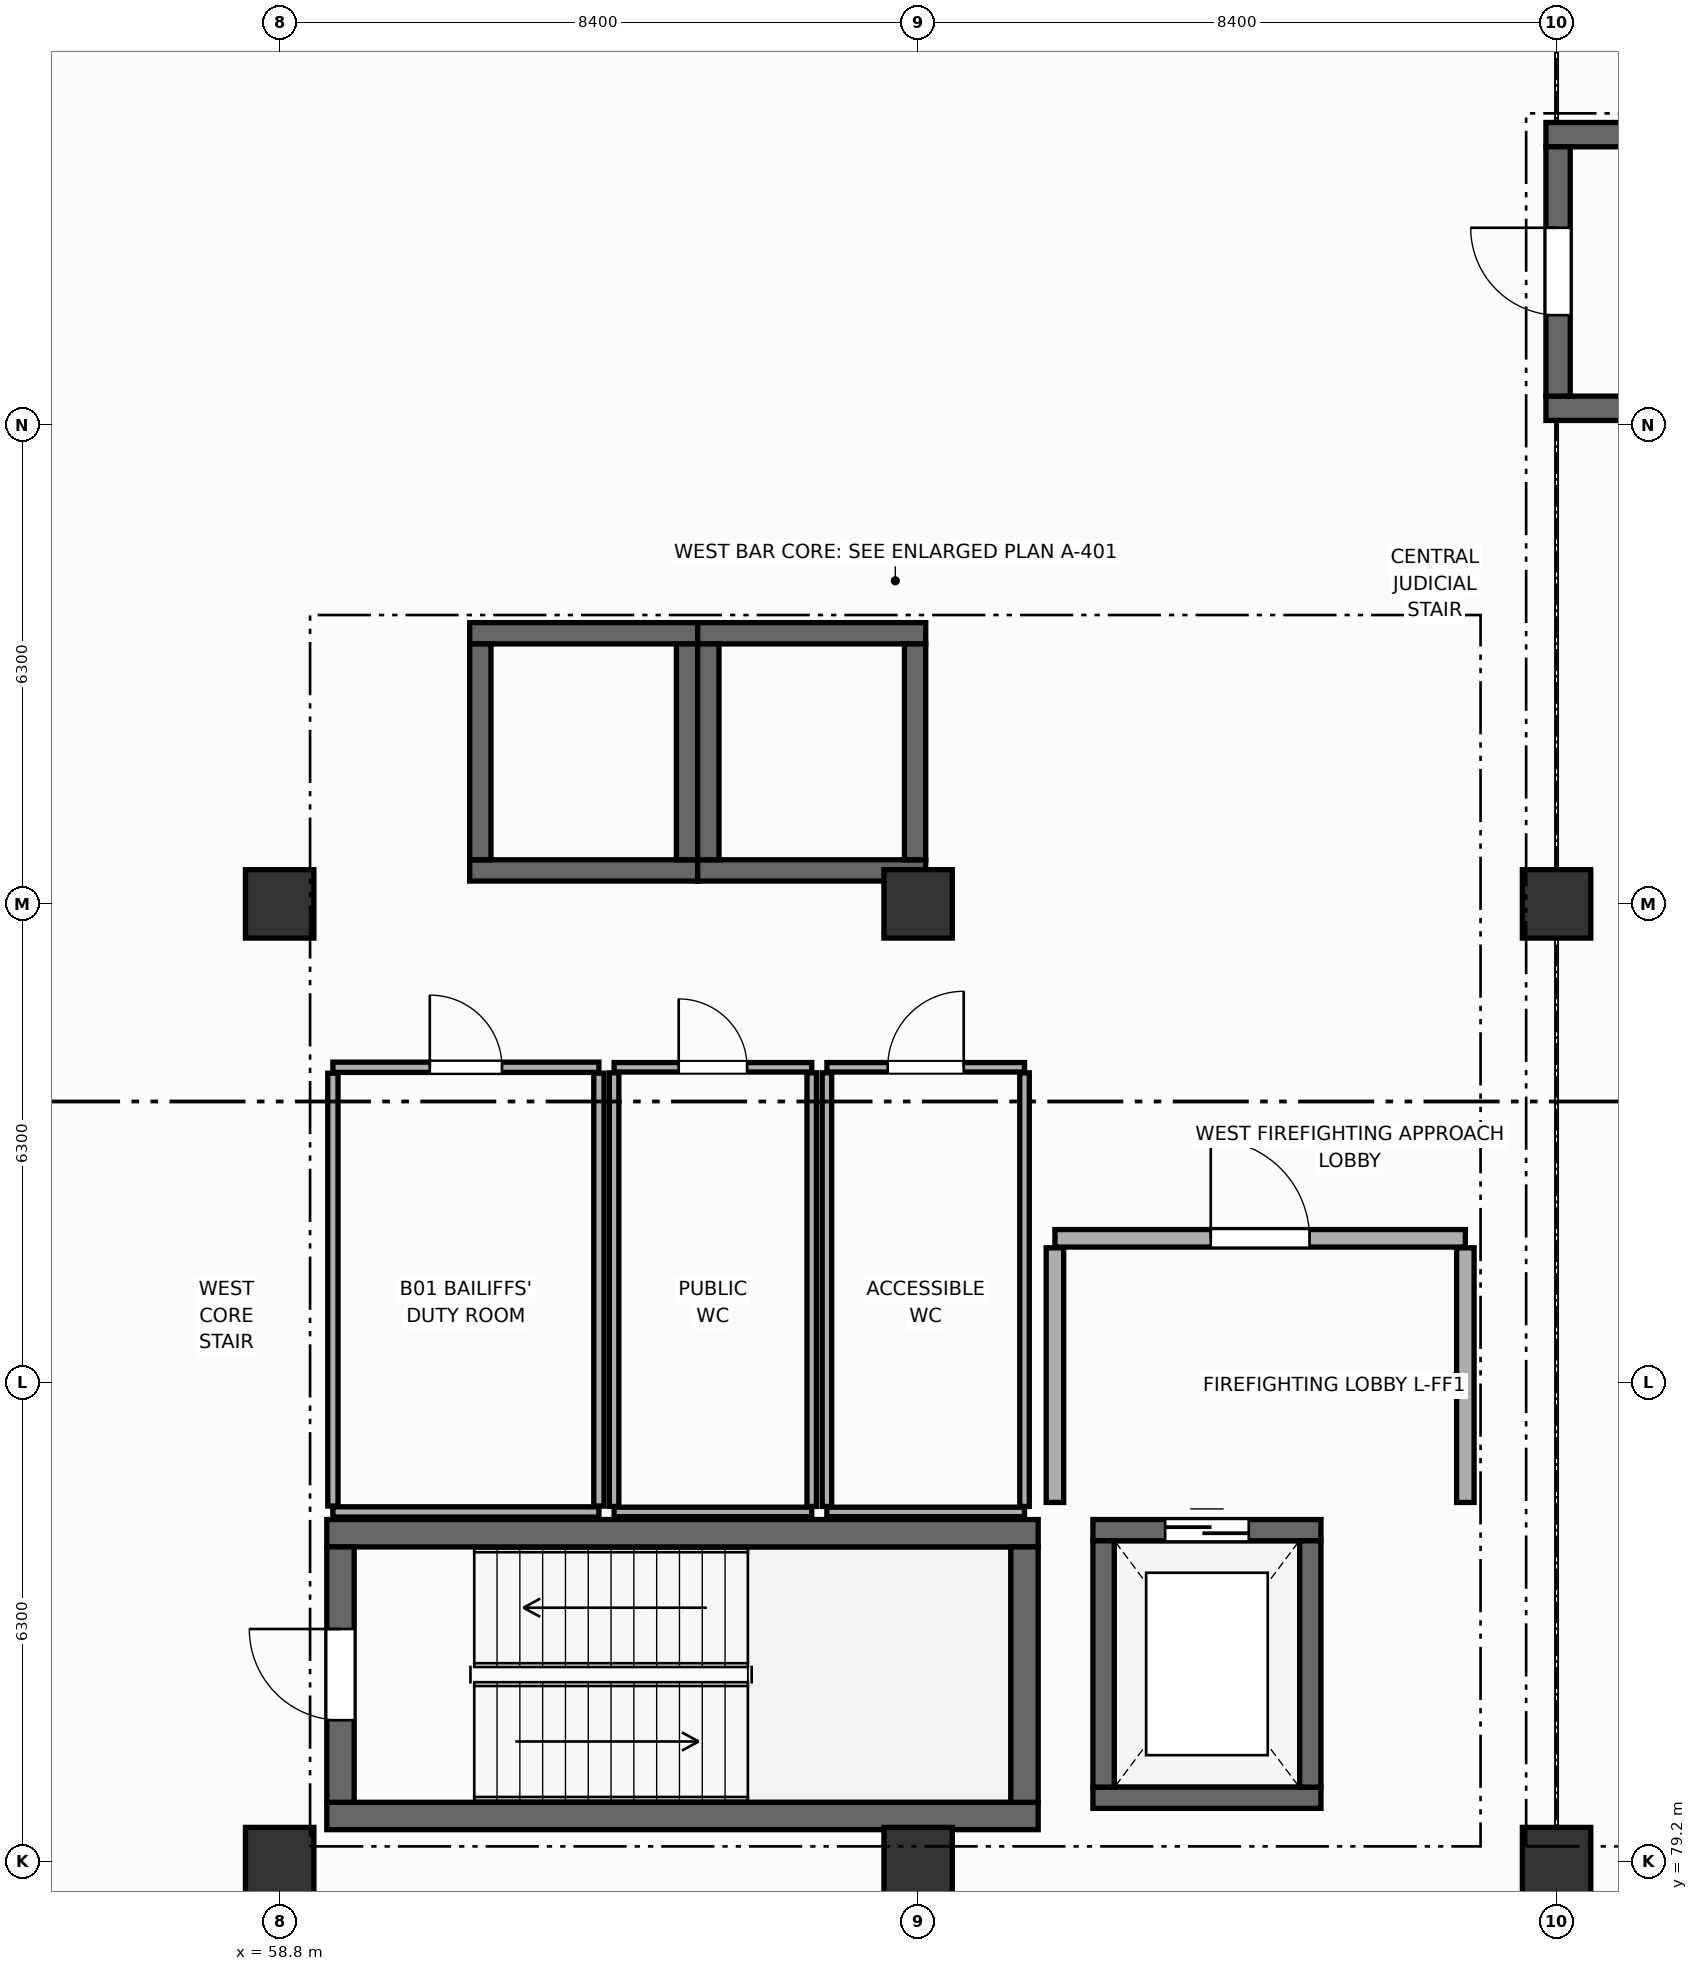
"""IFC4 building model, lengths in metres.
Left out: names, types, materials, properties, quantities, classifications, styles, units other than length and angle.
Written with IfcOpenShell. Run it as: python <this file> out.ifc"""

import sys

from ifc_helpers import new_model, si_unit, direction, frame, frame_2d, origin, origin_2d, place, context, subcontext, project, spatial, rectangle, extrude, element, fill, save


model = new_model("IFC4")
c1 = context("Model", 3, precision=1e-05, world=origin(), true_north=direction((0.0, 1.0)))
c2 = subcontext(c1, "Body", "Model", "MODEL_VIEW")
j1 = project(units=[si_unit("LENGTHUNIT", "METRE"), si_unit("PLANEANGLEUNIT", "RADIAN")], contexts=[c1])
p1 = place(None, origin())
s1 = spatial("IfcSite", under=j1, at=p1, CompositionType="ELEMENT")
p2 = place(p1, origin())
s2 = spatial("IfcBuilding", under=s1, at=p2, CompositionType="ELEMENT")
p3 = place(p2, frame((0.0, 0.0, -4.8)))
s3 = spatial("IfcBuildingStorey", under=s2, at=p3, CompositionType="ELEMENT", Elevation=-4.8)
for number, where, z_axis, x_axis in (
    (1, (58.8, 79.2, -0.42), (0.0, 0.0, 1.0), (1.0, 0.0, 0.0)),
    (2, (58.8, 91.8, -0.42), (0.0, 0.0, 1.0), (1.0, 0.0, 0.0)),
    (3, (67.2, 79.2, -0.42), (0.0, 0.0, 1.0), (1.0, 0.0, 0.0)),
    (4, (67.2, 91.8, -0.42), (0.0, 0.0, 1.0), (1.0, 0.0, 0.0)),
    (5, (75.6, 79.2, -0.42), (0.0, 0.0, 1.0), (1.0, 0.0, 0.0)),
    (6, (75.6, 91.8, -0.42), (0.0, 0.0, 1.0), (1.0, 0.0, 0.0)),
):
    element("IfcColumn", number, at=place(p3, frame(where, z_axis=z_axis, x_axis=x_axis)), inside=s3, PredefinedType="COLUMN", context=c2, shape_type="SweptSolid", body=[
        extrude(rectangle(XDim=0.9, YDim=0.9, at=origin_2d()), origin(), (0.0, 0.0, 1.0), 5.22),
    ])
for number, where, z_axis, x_axis in (
    (7, (59.42, 83.52, -0.42), (0.0, 0.0, 1.0), (1.0, 0.0, 0.0)),
    (8, (68.78, 79.8, -0.42), (0.0, 0.0, 1.0), (-1.0, 0.0, 0.0)),
):
    element("IfcWall", number, at=place(p3, frame(where, z_axis=z_axis, x_axis=x_axis)), inside=s3, PredefinedType="SHEAR", context=c2, shape_type="SweptSolid", body=[
        extrude(rectangle(XDim=9.36, YDim=0.36, at=frame_2d((4.68, 0.0))), origin(), (0.0, 0.0, 1.0), 4.94),
    ])
p4 = place(p3, frame((59.6, 79.98, -0.42), z_axis=(0.0, 0.0, 1.0), x_axis=(0.0, 1.0, 0.0)))
e9 = element("IfcWall", 9, at=p4, inside=s3, PredefinedType="SHEAR", context=c2, shape_type="SweptSolid", body=[
    extrude(rectangle(XDim=3.36, YDim=0.36, at=frame_2d((1.68, 0.0))), origin(), (0.0, 0.0, 1.0), 4.94),
])
p5 = place(p4, frame((1.08, 0.0, 0.42)))
e10 = element("IfcOpeningElement", 10, at=p5, cuts=e9, PredefinedType="OPENING", context=c2, shape_type="SweptSolid", body=[
    extrude(rectangle(XDim=1.2, YDim=2.2, at=frame_2d((0.6, 1.1))), frame((0.0, 0.19, 0.0), z_axis=(0.0, -1.0, 0.0), x_axis=(1.0, 0.0, 0.0)), (0.0, 0.0, 1.0), 0.38),
])
p6 = place(p3, frame((68.6, 83.34, -0.42), z_axis=(0.0, 0.0, 1.0), x_axis=(0.0, -1.0, 0.0)))
e11 = element("IfcWall", 11, at=p6, inside=s3, PredefinedType="SHEAR", context=c2, shape_type="SweptSolid", body=[
    extrude(rectangle(XDim=3.36, YDim=0.36, at=frame_2d((1.68, 0.0))), origin(), (0.0, 0.0, 1.0), 4.94),
])
for number, where, z_axis, x_axis in (
    (12, (75.46, 101.92, -0.42), (0.0, 0.0, 1.0), (1.0, 0.0, 0.0)),
    (13, (84.54, 98.32, -0.42), (0.0, 0.0, 1.0), (-1.0, 0.0, 0.0)),
):
    element("IfcWall", number, at=place(p3, frame(where, z_axis=z_axis, x_axis=x_axis)), inside=s3, PredefinedType="SHEAR", context=c2, shape_type="SweptSolid", body=[
        extrude(rectangle(XDim=9.08, YDim=0.32, at=frame_2d((4.54, 0.0))), origin(), (0.0, 0.0, 1.0), 4.94),
    ])
p7 = place(p3, frame((75.62, 98.48, -0.42), z_axis=(0.0, 0.0, 1.0), x_axis=(0.0, 1.0, 0.0)))
e14 = element("IfcWall", 14, at=p7, inside=s3, PredefinedType="SHEAR", context=c2, shape_type="SweptSolid", body=[
    extrude(rectangle(XDim=3.28, YDim=0.32, at=frame_2d((1.64, 0.0))), origin(), (0.0, 0.0, 1.0), 4.94),
])
p8 = place(p7, frame((1.065, 0.0, 0.42)))
e15 = element("IfcOpeningElement", 15, at=p8, cuts=e14, PredefinedType="OPENING", context=c2, shape_type="SweptSolid", body=[
    extrude(rectangle(XDim=1.15, YDim=2.2, at=frame_2d((0.575, 1.1))), frame((0.0, 0.17, 0.0), z_axis=(0.0, -1.0, 0.0), x_axis=(1.0, 0.0, 0.0)), (0.0, 0.0, 1.0), 0.34),
])
p9 = place(p3, frame((69.5, 83.56, -0.42), z_axis=(0.0, 0.0, 1.0), x_axis=(1.0, 0.0, 0.0)))
e16 = element("IfcWall", 16, at=p9, inside=s3, PredefinedType="SHEAR", context=c2, shape_type="SweptSolid", body=[
    extrude(rectangle(XDim=3.0, YDim=0.28, at=frame_2d((1.5, 0.0))), origin(), (0.0, 0.0, 1.0), 4.94),
])
p10 = place(p9, frame((0.95, 0.0, 0.42)))
e17 = element("IfcOpeningElement", 17, at=p10, cuts=e16, PredefinedType="OPENING", context=c2, shape_type="SweptSolid", body=[
    extrude(rectangle(XDim=1.1, YDim=2.2, at=frame_2d((0.55, 1.1))), frame((0.0, 0.15, 0.0), z_axis=(0.0, -1.0, 0.0), x_axis=(1.0, 0.0, 0.0)), (0.0, 0.0, 1.0), 0.3),
])
p11 = place(p3, frame((72.5, 80.04, -0.42), z_axis=(0.0, 0.0, 1.0), x_axis=(-1.0, 0.0, 0.0)))
e18 = element("IfcWall", 18, at=p11, inside=s3, PredefinedType="SHEAR", context=c2, shape_type="SweptSolid", body=[
    extrude(rectangle(XDim=3.0, YDim=0.28, at=frame_2d((1.5, 0.0))), origin(), (0.0, 0.0, 1.0), 4.94),
])
for number, where, z_axis, x_axis in (
    (19, (69.64, 80.18, -0.42), (0.0, 0.0, 1.0), (0.0, 1.0, 0.0)),
    (20, (72.36, 83.42, -0.42), (0.0, 0.0, 1.0), (0.0, -1.0, 0.0)),
):
    element("IfcWall", number, at=place(p3, frame(where, z_axis=z_axis, x_axis=x_axis)), inside=s3, PredefinedType="SHEAR", context=c2, shape_type="SweptSolid", body=[
        extrude(rectangle(XDim=3.24, YDim=0.28, at=frame_2d((1.62, 0.0))), origin(), (0.0, 0.0, 1.0), 4.94),
    ])
for number, where, z_axis, x_axis in (
    (21, (61.3, 95.36, -0.42), (0.0, 0.0, 1.0), (1.0, 0.0, 0.0)),
    (22, (64.3, 92.24, -0.42), (0.0, 0.0, 1.0), (-1.0, 0.0, 0.0)),
):
    element("IfcWall", number, at=place(p3, frame(where, z_axis=z_axis, x_axis=x_axis)), inside=s3, PredefinedType="SHEAR", context=c2, shape_type="SweptSolid", body=[
        extrude(rectangle(XDim=3.0, YDim=0.28, at=frame_2d((1.5, 0.0))), origin(), (0.0, 0.0, 1.0), 4.94),
    ])
for number, where, z_axis, x_axis in (
    (23, (61.44, 92.38, -0.42), (0.0, 0.0, 1.0), (0.0, 1.0, 0.0)),
    (24, (64.16, 95.22, -0.42), (0.0, 0.0, 1.0), (0.0, -1.0, 0.0)),
):
    element("IfcWall", number, at=place(p3, frame(where, z_axis=z_axis, x_axis=x_axis)), inside=s3, PredefinedType="SHEAR", context=c2, shape_type="SweptSolid", body=[
        extrude(rectangle(XDim=2.84, YDim=0.28, at=frame_2d((1.42, 0.0))), origin(), (0.0, 0.0, 1.0), 4.94),
    ])
for number, where, z_axis, x_axis in (
    (25, (64.3, 95.36, -0.42), (0.0, 0.0, 1.0), (1.0, 0.0, 0.0)),
    (26, (67.3, 92.24, -0.42), (0.0, 0.0, 1.0), (-1.0, 0.0, 0.0)),
):
    element("IfcWall", number, at=place(p3, frame(where, z_axis=z_axis, x_axis=x_axis)), inside=s3, PredefinedType="SHEAR", context=c2, shape_type="SweptSolid", body=[
        extrude(rectangle(XDim=3.0, YDim=0.28, at=frame_2d((1.5, 0.0))), origin(), (0.0, 0.0, 1.0), 4.94),
    ])
for number, where, z_axis, x_axis in (
    (27, (64.44, 92.38, -0.42), (0.0, 0.0, 1.0), (0.0, 1.0, 0.0)),
    (28, (67.16, 95.22, -0.42), (0.0, 0.0, 1.0), (0.0, -1.0, 0.0)),
):
    element("IfcWall", number, at=place(p3, frame(where, z_axis=z_axis, x_axis=x_axis)), inside=s3, PredefinedType="SHEAR", context=c2, shape_type="SweptSolid", body=[
        extrude(rectangle(XDim=2.84, YDim=0.28, at=frame_2d((1.42, 0.0))), origin(), (0.0, 0.0, 1.0), 4.94),
    ])
p12 = place(p3, frame((69.0, 87.4, 0.0), z_axis=(0.0, 0.0, 1.0), x_axis=(1.0, 0.0, 0.0)))
e29 = element("IfcWall", 29, at=p12, inside=s3, PredefinedType="STANDARD", context=c2, shape_type="SweptSolid", body=[
    extrude(rectangle(XDim=5.4, YDim=0.23, at=frame_2d((2.7, 0.0))), origin(), (0.0, 0.0, 1.0), 4.505),
])
p13 = place(p12, frame((2.05, 0.0, 0.0)))
e30 = element("IfcOpeningElement", 30, at=p13, cuts=e29, PredefinedType="OPENING", context=c2, shape_type="SweptSolid", body=[
    extrude(rectangle(XDim=1.3, YDim=2.2, at=frame_2d((0.65, 1.1))), frame((0.0, 0.125, 0.0), z_axis=(0.0, -1.0, 0.0), x_axis=(1.0, 0.0, 0.0)), (0.0, 0.0, 1.0), 0.25),
])
for number, where, z_axis, x_axis in (
    (31, (69.0, 83.925, 0.0), (0.0, 0.0, 1.0), (0.0, 1.0, 0.0)),
    (32, (74.4, 87.275, 0.0), (0.0, 0.0, 1.0), (0.0, -1.0, 0.0)),
):
    element("IfcWall", number, at=place(p3, frame(where, z_axis=z_axis, x_axis=x_axis)), inside=s3, PredefinedType="STANDARD", context=c2, shape_type="SweptSolid", body=[
        extrude(rectangle(XDim=3.35, YDim=0.23, at=frame_2d((1.675, 0.0))), origin(), (0.0, 0.0, 1.0), 4.505),
    ])
p14 = place(p3, frame((63.2, 89.65, 0.0), z_axis=(0.0, 0.0, 1.0), x_axis=(1.0, 0.0, 0.0)))
e33 = element("IfcWall", 33, at=p14, inside=s3, PredefinedType="PARTITIONING", context=c2, shape_type="SweptSolid", body=[
    extrude(rectangle(XDim=2.6, YDim=0.125, at=frame_2d((1.3, 0.0))), origin(), (0.0, 0.0, 1.0), 4.505),
])
p15 = place(p14, frame((0.85, 0.0, 0.0)))
e34 = element("IfcOpeningElement", 34, at=p15, cuts=e33, PredefinedType="OPENING", context=c2, shape_type="SweptSolid", body=[
    extrude(rectangle(XDim=0.9, YDim=2.1, at=frame_2d((0.45, 1.05))), frame((0.0, 0.073, 0.0), z_axis=(0.0, -1.0, 0.0), x_axis=(1.0, 0.0, 0.0)), (0.0, 0.0, 1.0), 0.145),
])
p16 = place(p3, frame((65.8, 83.8, 0.0), z_axis=(0.0, 0.0, 1.0), x_axis=(-1.0, 0.0, 0.0)))
e35 = element("IfcWall", 35, at=p16, inside=s3, PredefinedType="PARTITIONING", context=c2, shape_type="SweptSolid", body=[
    extrude(rectangle(XDim=2.6, YDim=0.125, at=frame_2d((1.3, 0.0))), origin(), (0.0, 0.0, 1.0), 4.505),
])
for number, where, z_axis, x_axis in (
    (36, (63.2, 83.873, 0.0), (0.0, 0.0, 1.0), (0.0, 1.0, 0.0)),
    (37, (65.8, 89.577, 0.0), (0.0, 0.0, 1.0), (0.0, -1.0, 0.0)),
):
    element("IfcWall", number, at=place(p3, frame(where, z_axis=z_axis, x_axis=x_axis)), inside=s3, PredefinedType="PARTITIONING", context=c2, shape_type="SweptSolid", body=[
        extrude(rectangle(XDim=5.705, YDim=0.125, at=frame_2d((2.853, 0.0))), origin(), (0.0, 0.0, 1.0), 4.505),
    ])
p17 = place(p3, frame((66.0, 89.65, 0.0), z_axis=(0.0, 0.0, 1.0), x_axis=(1.0, 0.0, 0.0)))
e38 = element("IfcWall", 38, at=p17, inside=s3, PredefinedType="PARTITIONING", context=c2, shape_type="SweptSolid", body=[
    extrude(rectangle(XDim=2.6, YDim=0.125, at=frame_2d((1.3, 0.0))), origin(), (0.0, 0.0, 1.0), 3.65),
])
p18 = place(p17, frame((0.8, 0.0, 0.0)))
e39 = element("IfcOpeningElement", 39, at=p18, cuts=e38, PredefinedType="OPENING", context=c2, shape_type="SweptSolid", body=[
    extrude(rectangle(XDim=1.0, YDim=2.1, at=frame_2d((0.5, 1.05))), frame((0.0, 0.073, 0.0), z_axis=(0.0, -1.0, 0.0), x_axis=(1.0, 0.0, 0.0)), (0.0, 0.0, 1.0), 0.145),
])
p19 = place(p3, frame((68.6, 83.8, 0.0), z_axis=(0.0, 0.0, 1.0), x_axis=(-1.0, 0.0, 0.0)))
e40 = element("IfcWall", 40, at=p19, inside=s3, PredefinedType="PARTITIONING", context=c2, shape_type="SweptSolid", body=[
    extrude(rectangle(XDim=2.6, YDim=0.125, at=frame_2d((1.3, 0.0))), origin(), (0.0, 0.0, 1.0), 3.65),
])
for number, where, z_axis, x_axis in (
    (41, (66.0, 83.873, 0.0), (0.0, 0.0, 1.0), (0.0, 1.0, 0.0)),
    (42, (68.6, 89.577, 0.0), (0.0, 0.0, 1.0), (0.0, -1.0, 0.0)),
):
    element("IfcWall", number, at=place(p3, frame(where, z_axis=z_axis, x_axis=x_axis)), inside=s3, PredefinedType="PARTITIONING", context=c2, shape_type="SweptSolid", body=[
        extrude(rectangle(XDim=5.705, YDim=0.125, at=frame_2d((2.853, 0.0))), origin(), (0.0, 0.0, 1.0), 4.505),
    ])
p20 = place(p3, frame((59.5, 89.65, 0.0), z_axis=(0.0, 0.0, 1.0), x_axis=(1.0, 0.0, 0.0)))
e43 = element("IfcWall", 43, at=p20, inside=s3, PredefinedType="PARTITIONING", context=c2, shape_type="SweptSolid", body=[
    extrude(rectangle(XDim=3.5, YDim=0.135, at=frame_2d((1.75, 0.0))), origin(), (0.0, 0.0, 1.0), 4.505),
])
p21 = place(p20, frame((1.275, 0.0, 0.0)))
e44 = element("IfcOpeningElement", 44, at=p21, cuts=e43, PredefinedType="OPENING", context=c2, shape_type="SweptSolid", body=[
    extrude(rectangle(XDim=0.95, YDim=2.15, at=frame_2d((0.475, 1.075))), frame((0.0, 0.077, 0.0), z_axis=(0.0, -1.0, 0.0), x_axis=(1.0, 0.0, 0.0)), (0.0, 0.0, 1.0), 0.155),
])
p22 = place(p3, frame((63.0, 83.8, 0.0), z_axis=(0.0, 0.0, 1.0), x_axis=(-1.0, 0.0, 0.0)))
e45 = element("IfcWall", 45, at=p22, inside=s3, PredefinedType="PARTITIONING", context=c2, shape_type="SweptSolid", body=[
    extrude(rectangle(XDim=3.5, YDim=0.135, at=frame_2d((1.75, 0.0))), origin(), (0.0, 0.0, 1.0), 4.505),
])
for number, where, z_axis, x_axis in (
    (46, (59.5, 83.877, 0.0), (0.0, 0.0, 1.0), (0.0, 1.0, 0.0)),
    (47, (63.0, 89.573, 0.0), (0.0, 0.0, 1.0), (0.0, -1.0, 0.0)),
):
    element("IfcWall", number, at=place(p3, frame(where, z_axis=z_axis, x_axis=x_axis)), inside=s3, PredefinedType="PARTITIONING", context=c2, shape_type="SweptSolid", body=[
        extrude(rectangle(XDim=5.695, YDim=0.135, at=frame_2d((2.848, 0.0))), origin(), (0.0, 0.0, 1.0), 4.505),
    ])
p23 = place(p5, origin())
e48 = element("IfcDoor", 48, at=p23, inside=s3, OperationType="SINGLE_SWING_RIGHT", PredefinedType="DOOR", context=c2, shape_type="SweptSolid", body=[
    extrude(rectangle(XDim=1.2, YDim=2.2, at=frame_2d((0.6, 1.1))), frame((0.0, 0.025, 0.0), z_axis=(0.0, -1.0, 0.0), x_axis=(1.0, 0.0, 0.0)), (0.0, 0.0, 1.0), 0.05),
])
fill(e10, e48)
p24 = place(p8, origin())
e49 = element("IfcDoor", 49, at=p24, inside=s3, OperationType="SINGLE_SWING_RIGHT", PredefinedType="DOOR", context=c2, shape_type="SweptSolid", body=[
    extrude(rectangle(XDim=1.15, YDim=2.2, at=frame_2d((0.575, 1.1))), frame((0.0, 0.025, 0.0), z_axis=(0.0, -1.0, 0.0), x_axis=(1.0, 0.0, 0.0)), (0.0, 0.0, 1.0), 0.05),
])
fill(e15, e49)
p25 = place(p10, origin())
e50 = element("IfcDoor", 50, at=p25, inside=s3, OperationType="DOUBLE_DOOR_SLIDING", PredefinedType="DOOR", context=c2, shape_type="SweptSolid", body=[
    extrude(rectangle(XDim=1.1, YDim=2.2, at=frame_2d((0.55, 1.1))), frame((0.0, 0.025, 0.0), z_axis=(0.0, -1.0, 0.0), x_axis=(1.0, 0.0, 0.0)), (0.0, 0.0, 1.0), 0.05),
])
fill(e17, e50)
p26 = place(p13, origin())
e51 = element("IfcDoor", 51, at=p26, inside=s3, OperationType="SINGLE_SWING_LEFT", PredefinedType="DOOR", context=c2, shape_type="SweptSolid", body=[
    extrude(rectangle(XDim=1.3, YDim=2.2, at=frame_2d((0.65, 1.1))), frame((0.0, 0.025, 0.0), z_axis=(0.0, -1.0, 0.0), x_axis=(1.0, 0.0, 0.0)), (0.0, 0.0, 1.0), 0.05),
])
fill(e30, e51)
p27 = place(p15, origin())
e52 = element("IfcDoor", 52, at=p27, inside=s3, OperationType="SINGLE_SWING_LEFT", PredefinedType="DOOR", context=c2, shape_type="SweptSolid", body=[
    extrude(rectangle(XDim=0.9, YDim=2.1, at=frame_2d((0.45, 1.05))), frame((0.0, 0.025, 0.0), z_axis=(0.0, -1.0, 0.0), x_axis=(1.0, 0.0, 0.0)), (0.0, 0.0, 1.0), 0.05),
])
fill(e34, e52)
p28 = place(p18, origin())
e53 = element("IfcDoor", 53, at=p28, inside=s3, OperationType="SINGLE_SWING_RIGHT", PredefinedType="DOOR", context=c2, shape_type="SweptSolid", body=[
    extrude(rectangle(XDim=1.0, YDim=2.1, at=frame_2d((0.5, 1.05))), frame((0.0, 0.025, 0.0), z_axis=(0.0, -1.0, 0.0), x_axis=(1.0, 0.0, 0.0)), (0.0, 0.0, 1.0), 0.05),
])
fill(e39, e53)
p29 = place(p21, origin())
e54 = element("IfcDoor", 54, at=p29, inside=s3, OperationType="SINGLE_SWING_LEFT", PredefinedType="DOOR", context=c2, shape_type="SweptSolid", body=[
    extrude(rectangle(XDim=0.95, YDim=2.15, at=frame_2d((0.475, 1.075))), frame((0.0, 0.025, 0.0), z_axis=(0.0, -1.0, 0.0), x_axis=(1.0, 0.0, 0.0)), (0.0, 0.0, 1.0), 0.05),
])
fill(e44, e54)
save(model, sys.argv[1])
